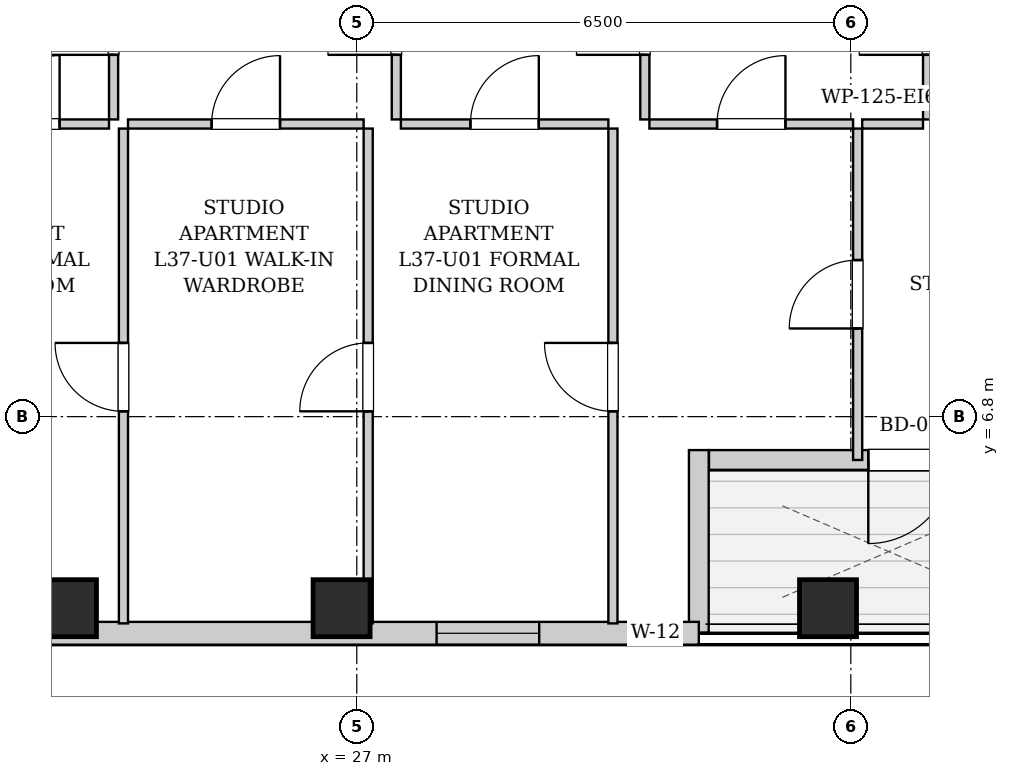
"""IFC4 building model, lengths in metres.
Left out: names, types, materials, properties, quantities, classifications, styles, units other than length and angle.
Written with IfcOpenShell. Run it as: python <this file> out.ifc"""

import sys

from ifc_helpers import new_model, si_unit, direction, frame, frame_2d, origin, origin_2d, place, context, subcontext, project, spatial, rectangle, extrude, element, fill, save


model = new_model("IFC4")
c1 = context("Model", 3, precision=1e-05, world=origin(), true_north=direction((0.0, 1.0)))
c2 = subcontext(c1, "Body", "Model", "MODEL_VIEW")
j1 = project(units=[si_unit("LENGTHUNIT", "METRE"), si_unit("PLANEANGLEUNIT", "RADIAN")], contexts=[c1])
p1 = place(None, origin())
s1 = spatial("IfcSite", under=j1, at=p1, CompositionType="ELEMENT")
p2 = place(p1, origin())
s2 = spatial("IfcBuilding", under=s1, at=p2, CompositionType="ELEMENT")
p3 = place(p2, frame((0.0, 0.0, 130.9)))
s3 = spatial("IfcBuildingStorey", under=s2, at=p3, CompositionType="ELEMENT", Elevation=130.9)
for number, where, z_axis, x_axis in (
    (1, (23.2, 4.28, 0.0), (0.0, 0.0, 1.0), (1.0, 0.0, 0.0)),
    (2, (26.8, 4.28, 0.0), (0.0, 0.0, 1.0), (1.0, 0.0, 0.0)),
    (3, (33.2, 4.28, 0.0), (0.0, 0.0, 1.0), (1.0, 0.0, 0.0)),
):
    element("IfcColumn", number, at=place(p3, frame(where, z_axis=z_axis, x_axis=x_axis)), inside=s3, PredefinedType="COLUMN", context=c2, shape_type="SweptSolid", body=[
        extrude(rectangle(XDim=0.75, YDim=0.75, at=origin_2d()), origin(), (0.0, 0.0, 1.0), 3.25),
    ])
p4 = place(p3, frame((36.366, 6.23, 0.0), z_axis=(0.0, 0.0, 1.0), x_axis=(-1.0, 0.0, 0.0)))
e4 = element("IfcWall", 4, at=p4, inside=s3, PredefinedType="SOLIDWALL", context=c2, shape_type="SweptSolid", body=[
    extrude(rectangle(XDim=4.732, YDim=0.26, at=frame_2d((2.366, 0.0))), origin(), (0.0, 0.0, 1.0), 2.99),
])
p5 = place(p4, frame((1.536, 0.0, 0.0)))
e5 = element("IfcOpeningElement", 5, at=p5, cuts=e4, PredefinedType="OPENING", context=c2, shape_type="SweptSolid", body=[
    extrude(rectangle(XDim=1.1, YDim=2.0, at=frame_2d((0.55, 1.0))), frame((0.0, 0.14, 0.0), z_axis=(0.0, -1.0, 0.0), x_axis=(1.0, 0.0, 0.0)), (0.0, 0.0, 1.0), 0.28),
])
p6 = place(p3, frame((31.5, 6.36, 0.0), z_axis=(0.0, 0.0, 1.0), x_axis=(0.0, -1.0, 0.0)))
e6 = element("IfcWall", 6, at=p6, inside=s3, PredefinedType="SOLIDWALL", context=c2, shape_type="SweptSolid", body=[
    extrude(rectangle(XDim=2.4, YDim=0.26, at=frame_2d((1.2, 0.0))), origin(), (0.0, 0.0, 1.0), 2.99),
])
p7 = place(p3, frame((31.5, 3.95, 0.0), z_axis=(0.0, 0.0, 1.0), x_axis=(-1.0, 0.0, 0.0)))
e7 = element("IfcWall", 7, at=p7, inside=s3, PredefinedType="SOLIDWALL", context=c2, shape_type="SweptSolid", body=[
    extrude(rectangle(XDim=15.6, YDim=0.3, at=frame_2d((7.8, 0.0))), origin(), (0.0, 0.0, 1.0), 2.99),
])
p8 = place(p7, frame((14.275, 0.0, 0.55)))
e8 = element("IfcOpeningElement", 8, at=p8, cuts=e7, PredefinedType="OPENING", context=c2, shape_type="SweptSolid", body=[
    extrude(rectangle(XDim=0.85, YDim=1.2, at=frame_2d((0.425, 0.6))), frame((0.0, 0.16, 0.0), z_axis=(0.0, -1.0, 0.0), x_axis=(1.0, 0.0, 0.0)), (0.0, 0.0, 1.0), 0.32),
])
p9 = place(p7, frame((11.7, 0.0, 0.55)))
e9 = element("IfcOpeningElement", 9, at=p9, cuts=e7, PredefinedType="OPENING", context=c2, shape_type="SweptSolid", body=[
    extrude(rectangle(XDim=1.35, YDim=1.2, at=frame_2d((0.675, 0.6))), frame((0.0, 0.16, 0.0), z_axis=(0.0, -1.0, 0.0), x_axis=(1.0, 0.0, 0.0)), (0.0, 0.0, 1.0), 0.32),
])
p10 = place(p7, frame((9.0, 0.0, 0.55)))
e10 = element("IfcOpeningElement", 10, at=p10, cuts=e7, PredefinedType="OPENING", context=c2, shape_type="SweptSolid", body=[
    extrude(rectangle(XDim=1.35, YDim=1.2, at=frame_2d((0.675, 0.6))), frame((0.0, 0.16, 0.0), z_axis=(0.0, -1.0, 0.0), x_axis=(1.0, 0.0, 0.0)), (0.0, 0.0, 1.0), 0.32),
])
p11 = place(p7, frame((2.1, 0.0, 0.55)))
e11 = element("IfcOpeningElement", 11, at=p11, cuts=e7, PredefinedType="OPENING", context=c2, shape_type="SweptSolid", body=[
    extrude(rectangle(XDim=1.35, YDim=1.2, at=frame_2d((0.675, 0.6))), frame((0.0, 0.16, 0.0), z_axis=(0.0, -1.0, 0.0), x_axis=(1.0, 0.0, 0.0)), (0.0, 0.0, 1.0), 0.32),
])
p12 = place(p7, frame((0.23, 0.0, 0.55)))
e12 = element("IfcOpeningElement", 12, at=p12, cuts=e7, PredefinedType="OPENING", context=c2, shape_type="SweptSolid", body=[
    extrude(rectangle(XDim=0.68, YDim=1.2, at=frame_2d((0.34, 0.6))), frame((0.0, 0.16, 0.0), z_axis=(0.0, -1.0, 0.0), x_axis=(1.0, 0.0, 0.0)), (0.0, 0.0, 1.0), 0.32),
])
p13 = place(p3, frame((23.8, 10.71, 0.0), z_axis=(0.0, 0.0, 1.0), x_axis=(0.0, 1.0, 0.0)))
e13 = element("IfcWall", 13, at=p13, inside=s3, PredefinedType="PARTITIONING", context=c2, shape_type="SweptSolid", body=[
    extrude(rectangle(XDim=2.6, YDim=0.12, at=frame_2d((1.3, 0.0))), origin(), (0.0, 0.0, 1.0), 2.99),
])
p14 = place(p13, frame((0.85, 0.0, 0.0)))
e14 = element("IfcOpeningElement", 14, at=p14, cuts=e13, PredefinedType="OPENING", context=c2, shape_type="SweptSolid", body=[
    extrude(rectangle(XDim=0.9, YDim=2.05, at=frame_2d((0.45, 1.025))), frame((0.0, 0.07, 0.0), z_axis=(0.0, -1.0, 0.0), x_axis=(1.0, 0.0, 0.0)), (0.0, 0.0, 1.0), 0.14),
])
p15 = place(p3, frame((21.54, 10.65, 0.0), z_axis=(0.0, 0.0, 1.0), x_axis=(1.0, 0.0, 0.0)))
e15 = element("IfcWall", 15, at=p15, inside=s3, PredefinedType="PARTITIONING", context=c2, shape_type="SweptSolid", body=[
    extrude(rectangle(XDim=2.2, YDim=0.12, at=frame_2d((1.1, 0.0))), origin(), (0.0, 0.0, 1.0), 2.99),
])
p16 = place(p15, frame((0.65, 0.0, 0.0)))
e16 = element("IfcOpeningElement", 16, at=p16, cuts=e15, PredefinedType="OPENING", context=c2, shape_type="SweptSolid", body=[
    extrude(rectangle(XDim=0.9, YDim=2.05, at=frame_2d((0.45, 1.025))), frame((0.0, 0.07, 0.0), z_axis=(0.0, -1.0, 0.0), x_axis=(1.0, 0.0, 0.0)), (0.0, 0.0, 1.0), 0.14),
])
p17 = place(p3, frame((27.52, 10.71, 0.0), z_axis=(0.0, 0.0, 1.0), x_axis=(0.0, 1.0, 0.0)))
e17 = element("IfcWall", 17, at=p17, inside=s3, PredefinedType="PARTITIONING", context=c2, shape_type="SweptSolid", body=[
    extrude(rectangle(XDim=2.6, YDim=0.12, at=frame_2d((1.3, 0.0))), origin(), (0.0, 0.0, 1.0), 2.99),
])
p18 = place(p17, frame((0.85, 0.0, 0.0)))
e18 = element("IfcOpeningElement", 18, at=p18, cuts=e17, PredefinedType="OPENING", context=c2, shape_type="SweptSolid", body=[
    extrude(rectangle(XDim=0.9, YDim=2.05, at=frame_2d((0.45, 1.025))), frame((0.0, 0.07, 0.0), z_axis=(0.0, -1.0, 0.0), x_axis=(1.0, 0.0, 0.0)), (0.0, 0.0, 1.0), 0.14),
])
p19 = place(p3, frame((23.99, 10.65, 0.0), z_axis=(0.0, 0.0, 1.0), x_axis=(1.0, 0.0, 0.0)))
e19 = element("IfcWall", 19, at=p19, inside=s3, PredefinedType="PARTITIONING", context=c2, shape_type="SweptSolid", body=[
    extrude(rectangle(XDim=3.1, YDim=0.12, at=frame_2d((1.55, 0.0))), origin(), (0.0, 0.0, 1.0), 2.99),
])
p20 = place(p19, frame((1.1, 0.0, 0.0)))
e20 = element("IfcOpeningElement", 20, at=p20, cuts=e19, PredefinedType="OPENING", context=c2, shape_type="SweptSolid", body=[
    extrude(rectangle(XDim=0.9, YDim=2.05, at=frame_2d((0.45, 1.025))), frame((0.0, 0.07, 0.0), z_axis=(0.0, -1.0, 0.0), x_axis=(1.0, 0.0, 0.0)), (0.0, 0.0, 1.0), 0.14),
])
p21 = place(p3, frame((30.79, 10.71, 0.0), z_axis=(0.0, 0.0, 1.0), x_axis=(0.0, 1.0, 0.0)))
e21 = element("IfcWall", 21, at=p21, inside=s3, PredefinedType="PARTITIONING", context=c2, shape_type="SweptSolid", body=[
    extrude(rectangle(XDim=2.6, YDim=0.12, at=frame_2d((1.3, 0.0))), origin(), (0.0, 0.0, 1.0), 2.99),
])
p22 = place(p21, frame((0.85, 0.0, 0.0)))
e22 = element("IfcOpeningElement", 22, at=p22, cuts=e21, PredefinedType="OPENING", context=c2, shape_type="SweptSolid", body=[
    extrude(rectangle(XDim=0.9, YDim=2.05, at=frame_2d((0.45, 1.025))), frame((0.0, 0.07, 0.0), z_axis=(0.0, -1.0, 0.0), x_axis=(1.0, 0.0, 0.0)), (0.0, 0.0, 1.0), 0.14),
])
p23 = place(p3, frame((27.58, 10.65, 0.0), z_axis=(0.0, 0.0, 1.0), x_axis=(1.0, 0.0, 0.0)))
e23 = element("IfcWall", 23, at=p23, inside=s3, PredefinedType="PARTITIONING", context=c2, shape_type="SweptSolid", body=[
    extrude(rectangle(XDim=2.73, YDim=0.12, at=frame_2d((1.365, 0.0))), origin(), (0.0, 0.0, 1.0), 2.99),
])
p24 = place(p23, frame((0.915, 0.0, 0.0)))
e24 = element("IfcOpeningElement", 24, at=p24, cuts=e23, PredefinedType="OPENING", context=c2, shape_type="SweptSolid", body=[
    extrude(rectangle(XDim=0.9, YDim=2.05, at=frame_2d((0.45, 1.025))), frame((0.0, 0.07, 0.0), z_axis=(0.0, -1.0, 0.0), x_axis=(1.0, 0.0, 0.0)), (0.0, 0.0, 1.0), 0.14),
])
p25 = place(p3, frame((34.51, 10.71, 0.0), z_axis=(0.0, 0.0, 1.0), x_axis=(0.0, 1.0, 0.0)))
e25 = element("IfcWall", 25, at=p25, inside=s3, PredefinedType="PARTITIONING", context=c2, shape_type="SweptSolid", body=[
    extrude(rectangle(XDim=2.6, YDim=0.12, at=frame_2d((1.3, 0.0))), origin(), (0.0, 0.0, 1.0), 2.99),
])
p26 = place(p25, frame((0.85, 0.0, 0.0)))
e26 = element("IfcOpeningElement", 26, at=p26, cuts=e25, PredefinedType="OPENING", context=c2, shape_type="SweptSolid", body=[
    extrude(rectangle(XDim=0.9, YDim=2.05, at=frame_2d((0.45, 1.025))), frame((0.0, 0.07, 0.0), z_axis=(0.0, -1.0, 0.0), x_axis=(1.0, 0.0, 0.0)), (0.0, 0.0, 1.0), 0.14),
])
p27 = place(p3, frame((30.85, 10.65, 0.0), z_axis=(0.0, 0.0, 1.0), x_axis=(1.0, 0.0, 0.0)))
e27 = element("IfcWall", 27, at=p27, inside=s3, PredefinedType="PARTITIONING", context=c2, shape_type="SweptSolid", body=[
    extrude(rectangle(XDim=2.68, YDim=0.12, at=frame_2d((1.34, 0.0))), origin(), (0.0, 0.0, 1.0), 2.99),
])
p28 = place(p27, frame((0.89, 0.0, 0.0)))
e28 = element("IfcOpeningElement", 28, at=p28, cuts=e27, PredefinedType="OPENING", context=c2, shape_type="SweptSolid", body=[
    extrude(rectangle(XDim=0.9, YDim=2.05, at=frame_2d((0.45, 1.025))), frame((0.0, 0.07, 0.0), z_axis=(0.0, -1.0, 0.0), x_axis=(1.0, 0.0, 0.0)), (0.0, 0.0, 1.0), 0.14),
])
p29 = place(p3, frame((33.65, 10.65, 0.0), z_axis=(0.0, 0.0, 1.0), x_axis=(1.0, 0.0, 0.0)))
e29 = element("IfcWall", 29, at=p29, inside=s3, PredefinedType="PARTITIONING", context=c2, shape_type="SweptSolid", body=[
    extrude(rectangle(XDim=0.8, YDim=0.12, at=frame_2d((0.4, 0.0))), origin(), (0.0, 0.0, 1.0), 2.99),
])
p30 = place(p3, frame((23.93, 4.08, 0.0), z_axis=(0.0, 0.0, 1.0), x_axis=(0.0, 1.0, 0.0)))
e30 = element("IfcWall", 30, at=p30, inside=s3, PredefinedType="PARTITIONING", context=c2, shape_type="SweptSolid", body=[
    extrude(rectangle(XDim=6.51, YDim=0.12, at=frame_2d((3.255, 0.0))), origin(), (0.0, 0.0, 1.0), 2.99),
])
p31 = place(p30, frame((2.79, 0.0, 0.0)))
e31 = element("IfcOpeningElement", 31, at=p31, cuts=e30, PredefinedType="OPENING", context=c2, shape_type="SweptSolid", body=[
    extrude(rectangle(XDim=0.9, YDim=2.05, at=frame_2d((0.45, 1.025))), frame((0.0, 0.07, 0.0), z_axis=(0.0, -1.0, 0.0), x_axis=(1.0, 0.0, 0.0)), (0.0, 0.0, 1.0), 0.14),
])
p32 = place(p3, frame((27.15, 4.08, 0.0), z_axis=(0.0, 0.0, 1.0), x_axis=(0.0, 1.0, 0.0)))
e32 = element("IfcWall", 32, at=p32, inside=s3, PredefinedType="PARTITIONING", context=c2, shape_type="SweptSolid", body=[
    extrude(rectangle(XDim=6.51, YDim=0.12, at=frame_2d((3.255, 0.0))), origin(), (0.0, 0.0, 1.0), 2.99),
])
p33 = place(p32, frame((2.79, 0.0, 0.0)))
e33 = element("IfcOpeningElement", 33, at=p33, cuts=e32, PredefinedType="OPENING", context=c2, shape_type="SweptSolid", body=[
    extrude(rectangle(XDim=0.9, YDim=2.05, at=frame_2d((0.45, 1.025))), frame((0.0, 0.07, 0.0), z_axis=(0.0, -1.0, 0.0), x_axis=(1.0, 0.0, 0.0)), (0.0, 0.0, 1.0), 0.14),
])
p34 = place(p3, frame((30.37, 4.08, 0.0), z_axis=(0.0, 0.0, 1.0), x_axis=(0.0, 1.0, 0.0)))
e34 = element("IfcWall", 34, at=p34, inside=s3, PredefinedType="PARTITIONING", context=c2, shape_type="SweptSolid", body=[
    extrude(rectangle(XDim=6.51, YDim=0.12, at=frame_2d((3.255, 0.0))), origin(), (0.0, 0.0, 1.0), 2.99),
])
p35 = place(p34, frame((2.79, 0.0, 0.0)))
e35 = element("IfcOpeningElement", 35, at=p35, cuts=e34, PredefinedType="OPENING", context=c2, shape_type="SweptSolid", body=[
    extrude(rectangle(XDim=0.9, YDim=2.05, at=frame_2d((0.45, 1.025))), frame((0.0, 0.07, 0.0), z_axis=(0.0, -1.0, 0.0), x_axis=(1.0, 0.0, 0.0)), (0.0, 0.0, 1.0), 0.14),
])
p36 = place(p3, frame((33.59, 6.23, 0.0), z_axis=(0.0, 0.0, 1.0), x_axis=(0.0, 1.0, 0.0)))
e36 = element("IfcWall", 36, at=p36, inside=s3, PredefinedType="PARTITIONING", context=c2, shape_type="SweptSolid", body=[
    extrude(rectangle(XDim=4.36, YDim=0.12, at=frame_2d((2.18, 0.0))), origin(), (0.0, 0.0, 1.0), 2.99),
])
p37 = place(p36, frame((1.73, 0.0, 0.0)))
e37 = element("IfcOpeningElement", 37, at=p37, cuts=e36, PredefinedType="OPENING", context=c2, shape_type="SweptSolid", body=[
    extrude(rectangle(XDim=0.9, YDim=2.05, at=frame_2d((0.45, 1.025))), frame((0.0, 0.07, 0.0), z_axis=(0.0, -1.0, 0.0), x_axis=(1.0, 0.0, 0.0)), (0.0, 0.0, 1.0), 0.14),
])
p38 = place(p14, origin())
e38 = element("IfcDoor", 38, at=p38, inside=s3, OperationType="SINGLE_SWING_LEFT", PredefinedType="DOOR", context=c2, shape_type="SweptSolid", body=[
    extrude(rectangle(XDim=0.9, YDim=2.05, at=frame_2d((0.45, 1.025))), frame((0.0, 0.025, 0.0), z_axis=(0.0, -1.0, 0.0), x_axis=(1.0, 0.0, 0.0)), (0.0, 0.0, 1.0), 0.05),
])
fill(e14, e38)
p39 = place(p16, origin())
e39 = element("IfcDoor", 39, at=p39, inside=s3, OperationType="SINGLE_SWING_RIGHT", PredefinedType="DOOR", context=c2, shape_type="SweptSolid", body=[
    extrude(rectangle(XDim=0.9, YDim=2.05, at=frame_2d((0.45, 1.025))), frame((0.0, 0.025, 0.0), z_axis=(0.0, -1.0, 0.0), x_axis=(1.0, 0.0, 0.0)), (0.0, 0.0, 1.0), 0.05),
])
fill(e16, e39)
p40 = place(p18, origin())
e40 = element("IfcDoor", 40, at=p40, inside=s3, OperationType="SINGLE_SWING_LEFT", PredefinedType="DOOR", context=c2, shape_type="SweptSolid", body=[
    extrude(rectangle(XDim=0.9, YDim=2.05, at=frame_2d((0.45, 1.025))), frame((0.0, 0.025, 0.0), z_axis=(0.0, -1.0, 0.0), x_axis=(1.0, 0.0, 0.0)), (0.0, 0.0, 1.0), 0.05),
])
fill(e18, e40)
p41 = place(p20, origin())
e41 = element("IfcDoor", 41, at=p41, inside=s3, OperationType="SINGLE_SWING_RIGHT", PredefinedType="DOOR", context=c2, shape_type="SweptSolid", body=[
    extrude(rectangle(XDim=0.9, YDim=2.05, at=frame_2d((0.45, 1.025))), frame((0.0, 0.025, 0.0), z_axis=(0.0, -1.0, 0.0), x_axis=(1.0, 0.0, 0.0)), (0.0, 0.0, 1.0), 0.05),
])
fill(e20, e41)
p42 = place(p22, origin())
e42 = element("IfcDoor", 42, at=p42, inside=s3, OperationType="SINGLE_SWING_LEFT", PredefinedType="DOOR", context=c2, shape_type="SweptSolid", body=[
    extrude(rectangle(XDim=0.9, YDim=2.05, at=frame_2d((0.45, 1.025))), frame((0.0, 0.025, 0.0), z_axis=(0.0, -1.0, 0.0), x_axis=(1.0, 0.0, 0.0)), (0.0, 0.0, 1.0), 0.05),
])
fill(e22, e42)
p43 = place(p24, origin())
e43 = element("IfcDoor", 43, at=p43, inside=s3, OperationType="SINGLE_SWING_RIGHT", PredefinedType="DOOR", context=c2, shape_type="SweptSolid", body=[
    extrude(rectangle(XDim=0.9, YDim=2.05, at=frame_2d((0.45, 1.025))), frame((0.0, 0.025, 0.0), z_axis=(0.0, -1.0, 0.0), x_axis=(1.0, 0.0, 0.0)), (0.0, 0.0, 1.0), 0.05),
])
fill(e24, e43)
p44 = place(p26, origin())
e44 = element("IfcDoor", 44, at=p44, inside=s3, OperationType="SINGLE_SWING_LEFT", PredefinedType="DOOR", context=c2, shape_type="SweptSolid", body=[
    extrude(rectangle(XDim=0.9, YDim=2.05, at=frame_2d((0.45, 1.025))), frame((0.0, 0.025, 0.0), z_axis=(0.0, -1.0, 0.0), x_axis=(1.0, 0.0, 0.0)), (0.0, 0.0, 1.0), 0.05),
])
fill(e26, e44)
p45 = place(p28, origin())
e45 = element("IfcDoor", 45, at=p45, inside=s3, OperationType="SINGLE_SWING_RIGHT", PredefinedType="DOOR", context=c2, shape_type="SweptSolid", body=[
    extrude(rectangle(XDim=0.9, YDim=2.05, at=frame_2d((0.45, 1.025))), frame((0.0, 0.025, 0.0), z_axis=(0.0, -1.0, 0.0), x_axis=(1.0, 0.0, 0.0)), (0.0, 0.0, 1.0), 0.05),
])
fill(e28, e45)
p46 = place(p31, origin())
e46 = element("IfcDoor", 46, at=p46, inside=s3, OperationType="SINGLE_SWING_RIGHT", PredefinedType="DOOR", context=c2, shape_type="SweptSolid", body=[
    extrude(rectangle(XDim=0.9, YDim=2.05, at=frame_2d((0.45, 1.025))), frame((0.0, 0.025, 0.0), z_axis=(0.0, -1.0, 0.0), x_axis=(1.0, 0.0, 0.0)), (0.0, 0.0, 1.0), 0.05),
])
fill(e31, e46)
p47 = place(p33, origin())
e47 = element("IfcDoor", 47, at=p47, inside=s3, OperationType="SINGLE_SWING_LEFT", PredefinedType="DOOR", context=c2, shape_type="SweptSolid", body=[
    extrude(rectangle(XDim=0.9, YDim=2.05, at=frame_2d((0.45, 1.025))), frame((0.0, 0.025, 0.0), z_axis=(0.0, -1.0, 0.0), x_axis=(1.0, 0.0, 0.0)), (0.0, 0.0, 1.0), 0.05),
])
fill(e33, e47)
p48 = place(p35, origin())
e48 = element("IfcDoor", 48, at=p48, inside=s3, OperationType="SINGLE_SWING_RIGHT", PredefinedType="DOOR", context=c2, shape_type="SweptSolid", body=[
    extrude(rectangle(XDim=0.9, YDim=2.05, at=frame_2d((0.45, 1.025))), frame((0.0, 0.025, 0.0), z_axis=(0.0, -1.0, 0.0), x_axis=(1.0, 0.0, 0.0)), (0.0, 0.0, 1.0), 0.05),
])
fill(e35, e48)
p49 = place(p37, origin())
e49 = element("IfcDoor", 49, at=p49, inside=s3, OperationType="SINGLE_SWING_LEFT", PredefinedType="DOOR", context=c2, shape_type="SweptSolid", body=[
    extrude(rectangle(XDim=0.9, YDim=2.05, at=frame_2d((0.45, 1.025))), frame((0.0, 0.025, 0.0), z_axis=(0.0, -1.0, 0.0), x_axis=(1.0, 0.0, 0.0)), (0.0, 0.0, 1.0), 0.05),
])
fill(e37, e49)
p50 = place(p5, origin())
e50 = element("IfcDoor", 50, at=p50, inside=s3, OperationType="SINGLE_SWING_RIGHT", PredefinedType="DOOR", context=c2, shape_type="SweptSolid", body=[
    extrude(rectangle(XDim=1.1, YDim=2.0, at=frame_2d((0.55, 1.0))), frame((0.0, 0.025, 0.0), z_axis=(0.0, -1.0, 0.0), x_axis=(1.0, 0.0, 0.0)), (0.0, 0.0, 1.0), 0.05),
])
fill(e5, e50)
p51 = place(p11, origin())
e51 = element("IfcWindow", 51, at=p51, inside=s3, PartitioningType="SINGLE_PANEL", PredefinedType="WINDOW", context=c2, shape_type="SweptSolid", body=[
    extrude(rectangle(XDim=1.35, YDim=1.2, at=frame_2d((0.675, 0.6))), frame((0.0, 0.03, 0.0), z_axis=(0.0, -1.0, 0.0), x_axis=(1.0, 0.0, 0.0)), (0.0, 0.0, 1.0), 0.06),
])
fill(e11, e51)
p52 = place(p12, origin())
e52 = element("IfcWindow", 52, at=p52, inside=s3, PartitioningType="SINGLE_PANEL", PredefinedType="WINDOW", context=c2, shape_type="SweptSolid", body=[
    extrude(rectangle(XDim=0.68, YDim=1.2, at=frame_2d((0.34, 0.6))), frame((0.0, 0.03, 0.0), z_axis=(0.0, -1.0, 0.0), x_axis=(1.0, 0.0, 0.0)), (0.0, 0.0, 1.0), 0.06),
])
fill(e12, e52)
save(model, sys.argv[1])
